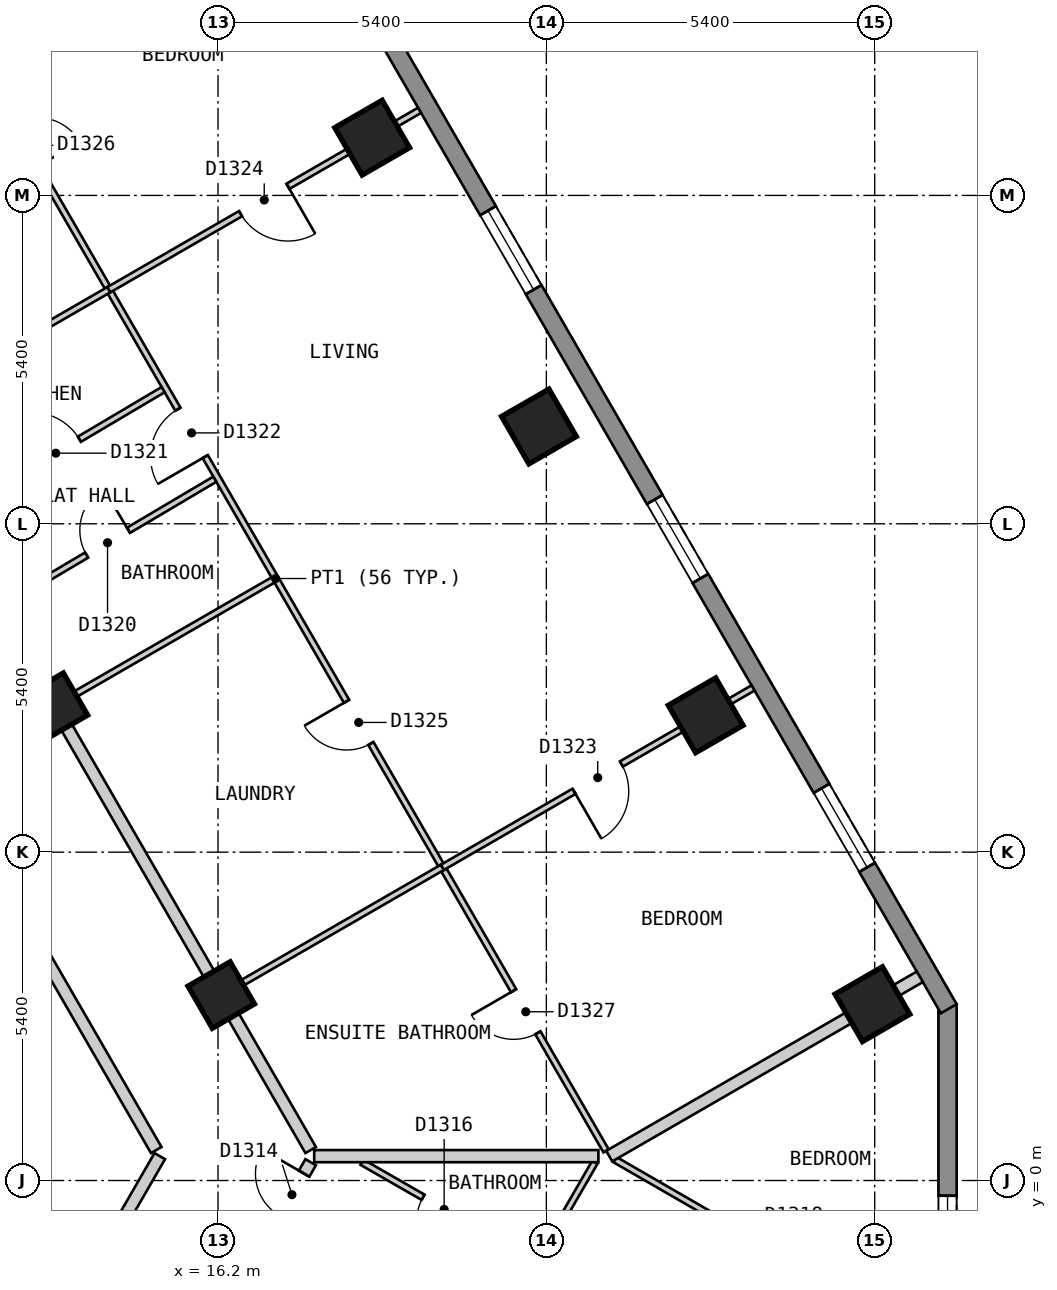
"""IFC4 building model, lengths in metres.
Left out: names, types, materials, properties, quantities, classifications, styles, units other than length and angle.
Written with IfcOpenShell. Run it as: python <this file> out.ifc"""

import sys

from ifc_helpers import new_model, si_unit, direction, frame, frame_2d, origin, origin_2d, place, context, subcontext, project, spatial, polyline, rectangle, outline, extrude, element, fill, save


model = new_model("IFC4")
c1 = context("Model", 3, precision=1e-05, world=origin(), true_north=direction((0.0, 1.0)))
c2 = subcontext(c1, "Body", "Model", "MODEL_VIEW")
j1 = project(units=[si_unit("LENGTHUNIT", "METRE"), si_unit("PLANEANGLEUNIT", "RADIAN")], contexts=[c1])
p1 = place(None, origin())
s1 = spatial("IfcSite", under=j1, at=p1, CompositionType="ELEMENT")
p2 = place(p1, origin())
s2 = spatial("IfcBuilding", under=s1, at=p2, CompositionType="ELEMENT")
p3 = place(p2, frame((0.0, 0.0, 135.6)))
s3 = spatial("IfcBuildingStorey", under=s2, at=p3, CompositionType="ELEMENT", Elevation=135.6)
for number, where, z_axis, x_axis in (
    (1, (26.963, 2.9, 0.0), (0.0, 0.0, 1.0), (-0.5, 0.866, 0.0)),
    (2, (24.22, 7.65, 0.0), (0.0, 0.0, 1.0), (-0.5, 0.866, 0.0)),
    (3, (21.478, 12.4, 0.0), (0.0, 0.0, 1.0), (-0.5, 0.866, 0.0)),
    (4, (18.735, 17.15, 0.0), (0.0, 0.0, 1.0), (-0.5, 0.866, 0.0)),
):
    element("IfcColumn", number, at=place(p3, frame(where, z_axis=z_axis, x_axis=x_axis)), inside=s3, PredefinedType="COLUMN", context=c2, shape_type="SweptSolid", body=[
        extrude(rectangle(XDim=0.9, YDim=0.9, at=origin_2d()), origin(), (0.0, 0.0, 1.0), 3.0),
    ])
for number, where, z_axis, x_axis in (
    (5, (16.253, 3.05, 0.0), (0.0, 0.0, 1.0), (-0.5, 0.866, 0.0)),
    (6, (13.51, 7.8, 0.0), (0.0, 0.0, 1.0), (-0.5, 0.866, 0.0)),
):
    element("IfcColumn", number, at=place(p3, frame(where, z_axis=z_axis, x_axis=x_axis)), inside=s3, PredefinedType="COLUMN", context=c2, shape_type="SweptSolid", body=[
        extrude(rectangle(XDim=0.8, YDim=0.8, at=origin_2d()), origin(), (0.0, 0.0, 1.0), 3.0),
    ])
p4 = place(p3, frame((28.198, -2.1, 0.0), z_axis=(0.0, 0.0, 1.0), x_axis=(0.0, 1.0, 0.0)))
e7 = element("IfcWall", 7, at=p4, inside=s3, PredefinedType="SOLIDWALL", context=c2, shape_type="SweptSolid", body=[
    extrude(outline(polyline([(0.0, -0.15), (5.0, -0.15), (4.92, 0.15), (0.08, 0.15), (0.0, -0.15)])), origin(), (0.0, 0.0, 1.0), 2.7),
])
p5 = place(p4, frame((0.65, 0.0, 0.15)))
e8 = element("IfcOpeningElement", 8, at=p5, cuts=e7, PredefinedType="OPENING", context=c2, shape_type="SweptSolid", body=[
    extrude(rectangle(XDim=1.2, YDim=2.1, at=frame_2d((0.6, 1.05))), frame((0.0, 0.16, 0.0), z_axis=(0.0, -1.0, 0.0), x_axis=(1.0, 0.0, 0.0)), (0.0, 0.0, 1.0), 0.32),
])
p6 = place(p3, frame((28.218, 2.825, 0.0), z_axis=(0.0, 0.0, 1.0), x_axis=(-0.500020536353, 0.866013546791, 0.0)))
e9 = element("IfcWall", 9, at=p6, inside=s3, PredefinedType="SOLIDWALL", context=c2, shape_type="SweptSolid", body=[
    extrude(outline(polyline([(0.0, -0.15), (23.325, -0.15), (23.245, 0.15), (0.08, 0.15), (0.0, -0.15)])), origin(), (0.0, 0.0, 1.0), 2.7),
])
p7 = place(p6, frame((2.685, 0.0, 0.15)))
e10 = element("IfcOpeningElement", 10, at=p7, cuts=e9, PredefinedType="OPENING", context=c2, shape_type="SweptSolid", body=[
    extrude(rectangle(XDim=1.5, YDim=2.1, at=frame_2d((0.75, 1.05))), frame((0.0, 0.16, 0.0), z_axis=(0.0, -1.0, 0.0), x_axis=(1.0, 0.0, 0.0)), (0.0, 0.0, 1.0), 0.32),
])
p8 = place(p6, frame((8.17, 0.0, 0.15)))
e11 = element("IfcOpeningElement", 11, at=p8, cuts=e9, PredefinedType="OPENING", context=c2, shape_type="SweptSolid", body=[
    extrude(rectangle(XDim=1.5, YDim=2.1, at=frame_2d((0.75, 1.05))), frame((0.0, 0.16, 0.0), z_axis=(0.0, -1.0, 0.0), x_axis=(1.0, 0.0, 0.0)), (0.0, 0.0, 1.0), 0.32),
])
p9 = place(p6, frame((13.655, 0.0, 0.15)))
e12 = element("IfcOpeningElement", 12, at=p9, cuts=e9, PredefinedType="OPENING", context=c2, shape_type="SweptSolid", body=[
    extrude(rectangle(XDim=1.5, YDim=2.1, at=frame_2d((0.75, 1.05))), frame((0.0, 0.16, 0.0), z_axis=(0.0, -1.0, 0.0), x_axis=(1.0, 0.0, 0.0)), (0.0, 0.0, 1.0), 0.32),
])
p10 = place(p6, frame((19.14, 0.0, 0.15)))
e13 = element("IfcOpeningElement", 13, at=p10, cuts=e9, PredefinedType="OPENING", context=c2, shape_type="SweptSolid", body=[
    extrude(rectangle(XDim=1.5, YDim=2.1, at=frame_2d((0.75, 1.05))), frame((0.0, 0.16, 0.0), z_axis=(0.0, -1.0, 0.0), x_axis=(1.0, 0.0, 0.0)), (0.0, 0.0, 1.0), 0.32),
])
p11 = place(p3, frame((7.967, 13.0, 0.0), z_axis=(0.0, 0.0, 1.0), x_axis=(0.50003774998, -0.866003607726, 0.0)))
e14 = element("IfcWall", 14, at=p11, inside=s3, PredefinedType="PARTITIONING", context=c2, shape_type="SweptSolid", body=[
    extrude(rectangle(XDim=14.433, YDim=0.2, at=frame_2d((7.217, 0.0))), origin(), (0.0, 0.0, 1.0), 2.7),
])
p12 = place(p11, frame((6.824, 0.0, 0.0)))
e15 = element("IfcOpeningElement", 15, at=p12, cuts=e14, PredefinedType="OPENING", context=c2, shape_type="SweptSolid", body=[
    extrude(rectangle(XDim=0.9, YDim=2.1, at=frame_2d((0.45, 1.05))), frame((0.0, 0.11, 0.0), z_axis=(0.0, -1.0, 0.0), x_axis=(1.0, 0.0, 0.0)), (0.0, 0.0, 1.0), 0.22),
])
p13 = place(p3, frame((9.296, 15.1, 0.0), z_axis=(0.0, 0.0, 1.0), x_axis=(0.499974024244, -0.866040400375, 0.0)))
e16 = element("IfcWall", 16, at=p13, inside=s3, PredefinedType="PARTITIONING", context=c2, shape_type="SweptSolid", body=[
    extrude(rectangle(XDim=16.857, YDim=0.2, at=frame_2d((8.429, 0.0))), origin(), (0.0, 0.0, 1.0), 2.7),
])
p14 = place(p13, frame((5.209, 0.0, 0.0)))
e17 = element("IfcOpeningElement", 17, at=p14, cuts=e16, PredefinedType="OPENING", context=c2, shape_type="SweptSolid", body=[
    extrude(rectangle(XDim=1.0, YDim=2.1, at=frame_2d((0.5, 1.05))), frame((0.0, 0.11, 0.0), z_axis=(0.0, -1.0, 0.0), x_axis=(1.0, 0.0, 0.0)), (0.0, 0.0, 1.0), 0.22),
])
p15 = place(p3, frame((13.394, -2.8, 0.0), z_axis=(0.0, 0.0, 1.0), x_axis=(0.499968324138, 0.866043691079, 0.0)))
e18 = element("IfcWall", 18, at=p15, inside=s3, PredefinedType="PARTITIONING", context=c2, shape_type="SweptSolid", body=[
    extrude(rectangle(XDim=3.696, YDim=0.2, at=frame_2d((1.848, 0.0))), origin(), (0.0, 0.0, 1.0), 2.7),
])
p16 = place(p3, frame((15.5, -3.552, 0.0), z_axis=(0.0, 0.0, 1.0), x_axis=(0.499928303779, 0.86606679366, 0.0)))
e19 = element("IfcWall", 19, at=p16, inside=s3, PredefinedType="PARTITIONING", context=c2, shape_type="SweptSolid", body=[
    extrude(rectangle(XDim=4.449, YDim=0.2, at=frame_2d((2.225, 0.0))), origin(), (0.0, 0.0, 1.0), 2.7),
])
p17 = place(p16, frame((3.432, 0.0, 0.0)))
e20 = element("IfcOpeningElement", 20, at=p17, cuts=e19, PredefinedType="OPENING", context=c2, shape_type="SweptSolid", body=[
    extrude(rectangle(XDim=0.8, YDim=2.1, at=frame_2d((0.4, 1.05))), frame((0.0, 0.11, 0.0), z_axis=(0.0, -1.0, 0.0), x_axis=(1.0, 0.0, 0.0)), (0.0, 0.0, 1.0), 0.22),
])
p18 = place(p3, frame((11.713, 19.313, 0.0), z_axis=(0.0, 0.0, 1.0), x_axis=(0.499999523185, -0.866025679073, 0.0)))
e21 = element("IfcWall", 21, at=p18, inside=s3, PredefinedType="PARTITIONING", context=c2, shape_type="SweptSolid", body=[
    extrude(rectangle(XDim=21.738, YDim=0.1, at=frame_2d((10.869, 0.0))), origin(), (0.0, 0.0, 1.0), 2.7),
])
p19 = place(p18, frame((7.654, 0.0, 0.0)))
e22 = element("IfcOpeningElement", 22, at=p19, cuts=e21, PredefinedType="OPENING", context=c2, shape_type="SweptSolid", body=[
    extrude(rectangle(XDim=0.9, YDim=2.1, at=frame_2d((0.45, 1.05))), frame((0.0, 0.06, 0.0), z_axis=(0.0, -1.0, 0.0), x_axis=(1.0, 0.0, 0.0)), (0.0, 0.0, 1.0), 0.12),
])
p20 = place(p18, frame((13.202, 0.0, 0.0)))
e23 = element("IfcOpeningElement", 23, at=p20, cuts=e21, PredefinedType="OPENING", context=c2, shape_type="SweptSolid", body=[
    extrude(rectangle(XDim=0.8, YDim=2.1, at=frame_2d((0.4, 1.05))), frame((0.0, 0.06, 0.0), z_axis=(0.0, -1.0, 0.0), x_axis=(1.0, 0.0, 0.0)), (0.0, 0.0, 1.0), 0.12),
])
p21 = place(p18, frame((2.242, 0.0, 0.0)))
e24 = element("IfcOpeningElement", 24, at=p21, cuts=e21, PredefinedType="OPENING", context=c2, shape_type="SweptSolid", body=[
    extrude(rectangle(XDim=0.8, YDim=2.1, at=frame_2d((0.4, 1.05))), frame((0.0, 0.06, 0.0), z_axis=(0.0, -1.0, 0.0), x_axis=(1.0, 0.0, 0.0)), (0.0, 0.0, 1.0), 0.12),
])
p22 = place(p18, frame((18.696, 0.0, 0.0)))
e25 = element("IfcOpeningElement", 25, at=p22, cuts=e21, PredefinedType="OPENING", context=c2, shape_type="SweptSolid", body=[
    extrude(rectangle(XDim=0.8, YDim=2.1, at=frame_2d((0.4, 1.05))), frame((0.0, 0.06, 0.0), z_axis=(0.0, -1.0, 0.0), x_axis=(1.0, 0.0, 0.0)), (0.0, 0.0, 1.0), 0.12),
])
p23 = place(p3, frame((18.568, 0.301, 0.0), z_axis=(0.0, 0.0, 1.0), x_axis=(0.867155675456, -0.49803718187, 0.0)))
e26 = element("IfcWall", 26, at=p23, inside=s3, PredefinedType="PARTITIONING", context=c2, shape_type="SweptSolid", body=[
    extrude(rectangle(XDim=3.267, YDim=0.1, at=frame_2d((1.633, 0.0))), origin(), (0.0, 0.0, 1.0), 2.7),
])
p24 = place(p23, frame((1.158, 0.0, 0.0)))
e27 = element("IfcOpeningElement", 27, at=p24, cuts=e26, PredefinedType="OPENING", context=c2, shape_type="SweptSolid", body=[
    extrude(rectangle(XDim=0.8, YDim=2.1, at=frame_2d((0.4, 1.05))), frame((0.0, 0.06, 0.0), z_axis=(0.0, -1.0, 0.0), x_axis=(1.0, 0.0, 0.0)), (0.0, 0.0, 1.0), 0.12),
])
p25 = place(p3, frame((22.729, 0.343, 0.0), z_axis=(0.0, 0.0, 1.0), x_axis=(0.865996608848, -0.500049870977, 0.0)))
e28 = element("IfcWall", 28, at=p25, inside=s3, PredefinedType="PARTITIONING", context=c2, shape_type="SweptSolid", body=[
    extrude(rectangle(XDim=5.788, YDim=0.1, at=frame_2d((2.894, 0.0))), origin(), (0.0, 0.0, 1.0), 2.7),
])
p26 = place(p25, frame((2.386, 0.0, 0.0)))
e29 = element("IfcOpeningElement", 29, at=p26, cuts=e28, PredefinedType="OPENING", context=c2, shape_type="SweptSolid", body=[
    extrude(rectangle(XDim=0.9, YDim=2.1, at=frame_2d((0.45, 1.05))), frame((0.0, 0.06, 0.0), z_axis=(0.0, -1.0, 0.0), x_axis=(1.0, 0.0, 0.0)), (0.0, 0.0, 1.0), 0.12),
])
p27 = place(p3, frame((19.633, -4.488, 0.0), z_axis=(0.0, 0.0, 1.0), x_axis=(0.499989971015, 0.866031193944, 0.0)))
e30 = element("IfcWall", 30, at=p27, inside=s3, PredefinedType="PARTITIONING", context=c2, shape_type="SweptSolid", body=[
    extrude(rectangle(XDim=5.53, YDim=0.1, at=frame_2d((2.765, 0.0))), origin(), (0.0, 0.0, 1.0), 2.7),
])
p28 = place(p27, frame((2.322, 0.0, 0.0)))
e31 = element("IfcOpeningElement", 31, at=p28, cuts=e30, PredefinedType="OPENING", context=c2, shape_type="SweptSolid", body=[
    extrude(rectangle(XDim=0.9, YDim=2.1, at=frame_2d((0.45, 1.05))), frame((0.0, 0.06, 0.0), z_axis=(0.0, -1.0, 0.0), x_axis=(1.0, 0.0, 0.0)), (0.0, 0.0, 1.0), 0.12),
])
p29 = place(p3, frame((16.339, 3.1, 0.0), z_axis=(0.0, 0.0, 1.0), x_axis=(0.866050731258, 0.499956128963, 0.0)))
e32 = element("IfcWall", 32, at=p29, inside=s3, PredefinedType="PARTITIONING", context=c2, shape_type="SweptSolid", body=[
    extrude(rectangle(XDim=4.1, YDim=0.1, at=frame_2d((2.05, 0.0))), origin(), (0.0, 0.0, 1.0), 2.7),
])
p30 = place(p3, frame((13.597, 7.85, 0.0), z_axis=(0.0, 0.0, 1.0), x_axis=(0.866015917575, 0.500016430238, 0.0)))
e33 = element("IfcWall", 33, at=p30, inside=s3, PredefinedType="PARTITIONING", context=c2, shape_type="SweptSolid", body=[
    extrude(rectangle(XDim=4.05, YDim=0.1, at=frame_2d((2.025, 0.0))), origin(), (0.0, 0.0, 1.0), 2.7),
])
p31 = place(p3, frame((10.854, 12.6, 0.0), z_axis=(0.0, 0.0, 1.0), x_axis=(0.86606561423, 0.499930346997, 0.0)))
e34 = element("IfcWall", 34, at=p31, inside=s3, PredefinedType="PARTITIONING", context=c2, shape_type="SweptSolid", body=[
    extrude(rectangle(XDim=4.1, YDim=0.1, at=frame_2d((2.05, 0.0))), origin(), (0.0, 0.0, 1.0), 2.7),
])
p32 = place(p3, frame((11.812, 10.942, 0.0), z_axis=(0.0, 0.0, 1.0), x_axis=(0.860404104761, 0.509612378687, 0.0)))
e35 = element("IfcWall", 35, at=p32, inside=s3, PredefinedType="PARTITIONING", context=c2, shape_type="SweptSolid", body=[
    extrude(rectangle(XDim=4.051, YDim=0.1, at=frame_2d((2.025, 0.0))), origin(), (0.0, 0.0, 1.0), 2.7),
])
p33 = place(p32, frame((1.55, 0.0, 0.0)))
e36 = element("IfcOpeningElement", 36, at=p33, cuts=e35, PredefinedType="OPENING", context=c2, shape_type="SweptSolid", body=[
    extrude(rectangle(XDim=0.9, YDim=2.1, at=frame_2d((0.45, 1.05))), frame((0.0, 0.06, 0.0), z_axis=(0.0, -1.0, 0.0), x_axis=(1.0, 0.0, 0.0)), (0.0, 0.0, 1.0), 0.12),
])
p34 = place(p3, frame((12.662, 9.47, 0.0), z_axis=(0.0, 0.0, 1.0), x_axis=(0.860520594262, 0.509415652341, 0.0)))
e37 = element("IfcWall", 37, at=p34, inside=s3, PredefinedType="PARTITIONING", context=c2, shape_type="SweptSolid", body=[
    extrude(rectangle(XDim=4.05, YDim=0.1, at=frame_2d((2.025, 0.0))), origin(), (0.0, 0.0, 1.0), 2.7),
])
p35 = place(p34, frame((1.6, 0.0, 0.0)))
e38 = element("IfcOpeningElement", 38, at=p35, cuts=e37, PredefinedType="OPENING", context=c2, shape_type="SweptSolid", body=[
    extrude(rectangle(XDim=0.8, YDim=2.1, at=frame_2d((0.4, 1.05))), frame((0.0, 0.06, 0.0), z_axis=(0.0, -1.0, 0.0), x_axis=(1.0, 0.0, 0.0)), (0.0, 0.0, 1.0), 0.12),
])
p36 = place(p3, frame((17.782, 0.401, 0.0), z_axis=(0.0, 0.0, 1.0), x_axis=(1.0, 0.0, 0.0)))
e39 = element("IfcWall", 39, at=p36, inside=s3, PredefinedType="PARTITIONING", context=c2, shape_type="SweptSolid", body=[
    extrude(rectangle(XDim=4.674, YDim=0.2, at=frame_2d((2.337, 0.0))), origin(), (0.0, 0.0, 1.0), 2.7),
])
p37 = place(p3, frame((22.634, 0.401, 0.0), z_axis=(0.0, 0.0, 1.0), x_axis=(0.86601325737, 0.500021037617, 0.0)))
e40 = element("IfcWall", 40, at=p37, inside=s3, PredefinedType="PARTITIONING", context=c2, shape_type="SweptSolid", body=[
    extrude(rectangle(XDim=5.898, YDim=0.2, at=frame_2d((2.949, 0.0))), origin(), (0.0, 0.0, 1.0), 2.7),
])
p38 = place(p3, frame((19.89, 5.15, 0.0), z_axis=(0.0, 0.0, 1.0), x_axis=(0.865993310977, 0.500055582255, 0.0)))
e41 = element("IfcWall", 41, at=p38, inside=s3, PredefinedType="PARTITIONING", context=c2, shape_type="SweptSolid", body=[
    extrude(rectangle(XDim=5.9, YDim=0.1, at=frame_2d((2.95, 0.0))), origin(), (0.0, 0.0, 1.0), 2.7),
])
p39 = place(p38, frame((2.5, 0.0, 0.0)))
e42 = element("IfcOpeningElement", 42, at=p39, cuts=e41, PredefinedType="OPENING", context=c2, shape_type="SweptSolid", body=[
    extrude(rectangle(XDim=0.9, YDim=2.1, at=frame_2d((0.45, 1.05))), frame((0.0, 0.06, 0.0), z_axis=(0.0, -1.0, 0.0), x_axis=(1.0, 0.0, 0.0)), (0.0, 0.0, 1.0), 0.12),
])
p40 = place(p3, frame((14.405, 14.65, 0.0), z_axis=(0.0, 0.0, 1.0), x_axis=(0.866054644421, 0.499949350311, 0.0)))
e43 = element("IfcWall", 43, at=p40, inside=s3, PredefinedType="PARTITIONING", context=c2, shape_type="SweptSolid", body=[
    extrude(rectangle(XDim=5.899, YDim=0.1, at=frame_2d((2.949, 0.0))), origin(), (0.0, 0.0, 1.0), 2.7),
])
p41 = place(p40, frame((2.5, 0.0, 0.0)))
e44 = element("IfcOpeningElement", 44, at=p41, cuts=e43, PredefinedType="OPENING", context=c2, shape_type="SweptSolid", body=[
    extrude(rectangle(XDim=0.9, YDim=2.1, at=frame_2d((0.45, 1.05))), frame((0.0, 0.06, 0.0), z_axis=(0.0, -1.0, 0.0), x_axis=(1.0, 0.0, 0.0)), (0.0, 0.0, 1.0), 0.12),
])
p42 = place(p5, origin())
e45 = element("IfcWindow", 45, at=p42, inside=s3, PartitioningType="SINGLE_PANEL", PredefinedType="WINDOW", context=c2, shape_type="SweptSolid", body=[
    extrude(rectangle(XDim=1.2, YDim=2.1, at=frame_2d((0.6, 1.05))), frame((0.0, 0.03, 0.0), z_axis=(0.0, -1.0, 0.0), x_axis=(1.0, 0.0, 0.0)), (0.0, 0.0, 1.0), 0.06),
])
fill(e8, e45)
p43 = place(p7, origin())
e46 = element("IfcWindow", 46, at=p43, inside=s3, PartitioningType="SINGLE_PANEL", PredefinedType="WINDOW", context=c2, shape_type="SweptSolid", body=[
    extrude(rectangle(XDim=1.5, YDim=2.1, at=frame_2d((0.75, 1.05))), frame((0.0, 0.03, 0.0), z_axis=(0.0, -1.0, 0.0), x_axis=(1.0, 0.0, 0.0)), (0.0, 0.0, 1.0), 0.06),
])
fill(e10, e46)
p44 = place(p8, origin())
e47 = element("IfcWindow", 47, at=p44, inside=s3, PartitioningType="SINGLE_PANEL", PredefinedType="WINDOW", context=c2, shape_type="SweptSolid", body=[
    extrude(rectangle(XDim=1.5, YDim=2.1, at=frame_2d((0.75, 1.05))), frame((0.0, 0.03, 0.0), z_axis=(0.0, -1.0, 0.0), x_axis=(1.0, 0.0, 0.0)), (0.0, 0.0, 1.0), 0.06),
])
fill(e11, e47)
p45 = place(p9, origin())
e48 = element("IfcWindow", 48, at=p45, inside=s3, PartitioningType="SINGLE_PANEL", PredefinedType="WINDOW", context=c2, shape_type="SweptSolid", body=[
    extrude(rectangle(XDim=1.5, YDim=2.1, at=frame_2d((0.75, 1.05))), frame((0.0, 0.03, 0.0), z_axis=(0.0, -1.0, 0.0), x_axis=(1.0, 0.0, 0.0)), (0.0, 0.0, 1.0), 0.06),
])
fill(e12, e48)
p46 = place(p17, origin())
e49 = element("IfcDoor", 49, at=p46, inside=s3, OperationType="SINGLE_SWING_RIGHT", PredefinedType="DOOR", context=c2, shape_type="SweptSolid", body=[
    extrude(rectangle(XDim=0.8, YDim=2.1, at=frame_2d((0.4, 1.05))), frame((0.0, 0.025, 0.0), z_axis=(0.0, -1.0, 0.0), x_axis=(1.0, 0.0, 0.0)), (0.0, 0.0, 1.0), 0.05),
])
fill(e20, e49)
p47 = place(p24, origin())
e50 = element("IfcDoor", 50, at=p47, inside=s3, OperationType="SINGLE_SWING_RIGHT", PredefinedType="DOOR", context=c2, shape_type="SweptSolid", body=[
    extrude(rectangle(XDim=0.8, YDim=2.1, at=frame_2d((0.4, 1.05))), frame((0.0, 0.025, 0.0), z_axis=(0.0, -1.0, 0.0), x_axis=(1.0, 0.0, 0.0)), (0.0, 0.0, 1.0), 0.05),
])
fill(e27, e50)
p48 = place(p35, origin())
e51 = element("IfcDoor", 51, at=p48, inside=s3, OperationType="SINGLE_SWING_RIGHT", PredefinedType="DOOR", context=c2, shape_type="SweptSolid", body=[
    extrude(rectangle(XDim=0.8, YDim=2.1, at=frame_2d((0.4, 1.05))), frame((0.0, 0.025, 0.0), z_axis=(0.0, -1.0, 0.0), x_axis=(1.0, 0.0, 0.0)), (0.0, 0.0, 1.0), 0.05),
])
fill(e38, e51)
p49 = place(p33, origin())
e52 = element("IfcDoor", 52, at=p49, inside=s3, OperationType="SINGLE_SWING_LEFT", PredefinedType="DOOR", context=c2, shape_type="SweptSolid", body=[
    extrude(rectangle(XDim=0.9, YDim=2.1, at=frame_2d((0.45, 1.05))), frame((0.0, 0.025, 0.0), z_axis=(0.0, -1.0, 0.0), x_axis=(1.0, 0.0, 0.0)), (0.0, 0.0, 1.0), 0.05),
])
fill(e36, e52)
p50 = place(p19, origin())
e53 = element("IfcDoor", 53, at=p50, inside=s3, OperationType="SINGLE_SWING_RIGHT", PredefinedType="DOOR", context=c2, shape_type="SweptSolid", body=[
    extrude(rectangle(XDim=0.9, YDim=2.1, at=frame_2d((0.45, 1.05))), frame((0.0, 0.025, 0.0), z_axis=(0.0, -1.0, 0.0), x_axis=(1.0, 0.0, 0.0)), (0.0, 0.0, 1.0), 0.05),
])
fill(e22, e53)
p51 = place(p39, origin())
e54 = element("IfcDoor", 54, at=p51, inside=s3, OperationType="SINGLE_SWING_LEFT", PredefinedType="DOOR", context=c2, shape_type="SweptSolid", body=[
    extrude(rectangle(XDim=0.9, YDim=2.1, at=frame_2d((0.45, 1.05))), frame((0.0, 0.025, 0.0), z_axis=(0.0, -1.0, 0.0), x_axis=(1.0, 0.0, 0.0)), (0.0, 0.0, 1.0), 0.05),
])
fill(e42, e54)
p52 = place(p41, origin())
e55 = element("IfcDoor", 55, at=p52, inside=s3, OperationType="SINGLE_SWING_RIGHT", PredefinedType="DOOR", context=c2, shape_type="SweptSolid", body=[
    extrude(rectangle(XDim=0.9, YDim=2.1, at=frame_2d((0.45, 1.05))), frame((0.0, 0.025, 0.0), z_axis=(0.0, -1.0, 0.0), x_axis=(1.0, 0.0, 0.0)), (0.0, 0.0, 1.0), 0.05),
])
fill(e44, e55)
p53 = place(p20, origin())
e56 = element("IfcDoor", 56, at=p53, inside=s3, OperationType="SINGLE_SWING_LEFT", PredefinedType="DOOR", context=c2, shape_type="SweptSolid", body=[
    extrude(rectangle(XDim=0.8, YDim=2.1, at=frame_2d((0.4, 1.05))), frame((0.0, 0.025, 0.0), z_axis=(0.0, -1.0, 0.0), x_axis=(1.0, 0.0, 0.0)), (0.0, 0.0, 1.0), 0.05),
])
fill(e23, e56)
p54 = place(p22, origin())
e57 = element("IfcDoor", 57, at=p54, inside=s3, OperationType="SINGLE_SWING_LEFT", PredefinedType="DOOR", context=c2, shape_type="SweptSolid", body=[
    extrude(rectangle(XDim=0.8, YDim=2.1, at=frame_2d((0.4, 1.05))), frame((0.0, 0.025, 0.0), z_axis=(0.0, -1.0, 0.0), x_axis=(1.0, 0.0, 0.0)), (0.0, 0.0, 1.0), 0.05),
])
fill(e25, e57)
save(model, sys.argv[1])
